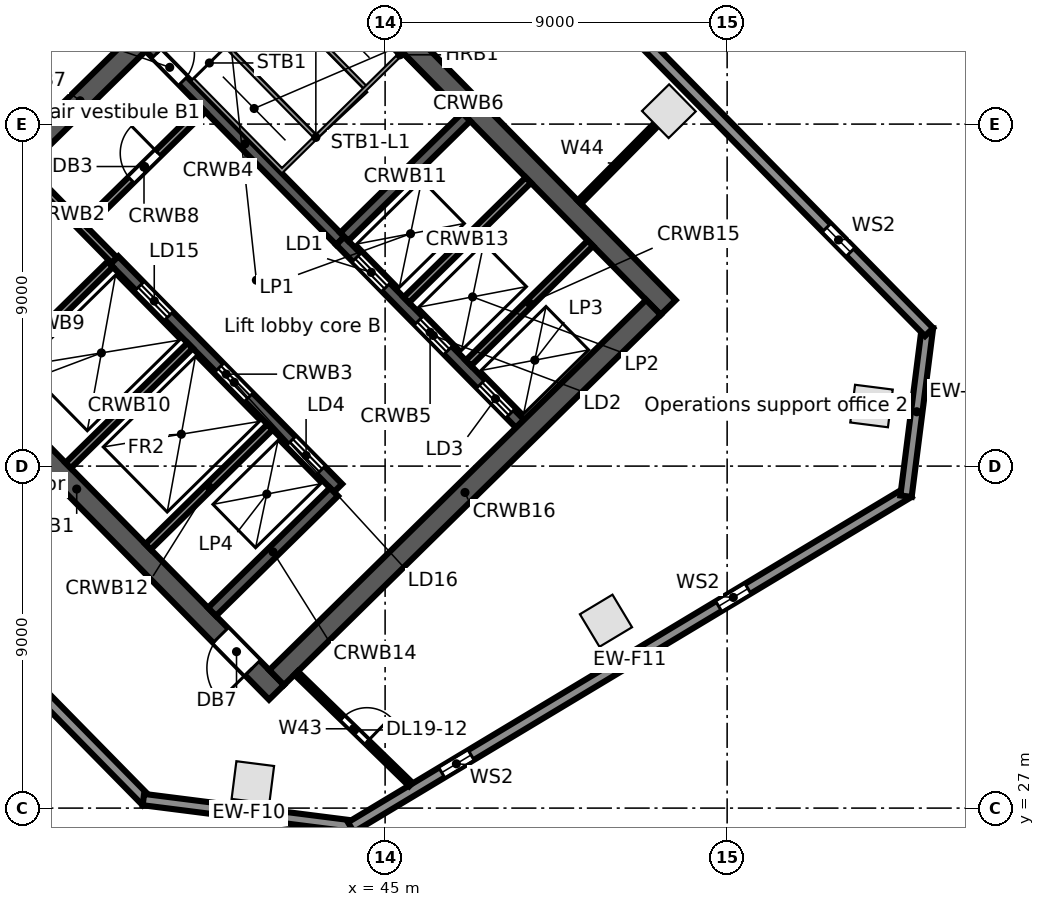
"""IFC4 building model, lengths in metres.
Left out: names, types, materials, properties, quantities, classifications, styles, units other than length and angle.
Written with IfcOpenShell. Run it as: python <this file> out.ifc"""

import sys

from ifc_helpers import new_model, si_unit, direction, frame, frame_2d, origin, origin_2d, place, context, subcontext, project, spatial, rectangle, extrude, element, fill, save


model = new_model("IFC4")
c1 = context("Model", 3, precision=1e-05, world=origin(), true_north=direction((0.0, 1.0)))
c2 = subcontext(c1, "Body", "Model", "MODEL_VIEW")
j1 = project(units=[si_unit("LENGTHUNIT", "METRE"), si_unit("PLANEANGLEUNIT", "RADIAN")], contexts=[c1])
p1 = place(None, origin())
s1 = spatial("IfcSite", under=j1, at=p1, CompositionType="ELEMENT")
p2 = place(p1, origin())
s2 = spatial("IfcBuilding", under=s1, at=p2, CompositionType="ELEMENT")
p3 = place(p2, frame((0.0, 0.0, 97.1)))
s3 = spatial("IfcBuildingStorey", under=s2, at=p3, CompositionType="ELEMENT", Elevation=97.1)
for number, where, z_axis, x_axis in (
    (1, (41.52, 27.675, 0.0), (0.0, 0.0, 1.0), (0.992, -0.126, 0.0)),
    (2, (50.812, 31.931, 0.0), (0.0, 0.0, 1.0), (0.857, 0.515, 0.0)),
    (3, (57.799, 37.581, 0.0), (0.0, 0.0, 1.0), (0.126, 0.992, 0.0)),
    (4, (52.467, 45.339, 0.0), (0.0, 0.0, 1.0), (-0.701, 0.713, 0.0)),
):
    element("IfcColumn", number, at=place(p3, frame(where, z_axis=z_axis, x_axis=x_axis)), inside=s3, PredefinedType="COLUMN", context=c2, shape_type="SweptSolid", body=[
        extrude(rectangle(XDim=1.0, YDim=1.0, at=origin_2d()), origin(), (0.0, 0.0, 1.0), 4.4),
    ])
p4 = place(p3, frame((38.727, 27.181, 0.0), z_axis=(0.0, 0.0, 1.0), x_axis=(-0.700906405975, 0.713253258011, 0.0)))
e5 = element("IfcWall", 5, at=p4, inside=s3, PredefinedType="STANDARD", context=c2, shape_type="SweptSolid", body=[
    extrude(rectangle(XDim=18.923, YDim=0.3, at=frame_2d((9.462, 0.0))), origin(), (0.0, 0.0, 1.0), 4.08),
])
p5 = place(p4, frame((14.967, 0.0, 0.6)))
e6 = element("IfcOpeningElement", 6, at=p5, cuts=e5, PredefinedType="OPENING", context=c2, shape_type="SweptSolid", body=[
    extrude(rectangle(XDim=0.9, YDim=2.8, at=frame_2d((0.45, 1.4))), frame((0.0, 0.16, 0.0), z_axis=(0.0, -1.0, 0.0), x_axis=(1.0, 0.0, 0.0)), (0.0, 0.0, 1.0), 0.32),
])
p6 = place(p4, frame((5.512, 0.0, 0.6)))
e7 = element("IfcOpeningElement", 7, at=p6, cuts=e5, PredefinedType="OPENING", context=c2, shape_type="SweptSolid", body=[
    extrude(rectangle(XDim=0.9, YDim=2.8, at=frame_2d((0.45, 1.4))), frame((0.0, 0.16, 0.0), z_axis=(0.0, -1.0, 0.0), x_axis=(1.0, 0.0, 0.0)), (0.0, 0.0, 1.0), 0.32),
])
p7 = place(p3, frame((44.196, 26.518, 0.0), z_axis=(0.0, 0.0, 1.0), x_axis=(-0.992001881269, 0.126223086474, 0.0)))
e8 = element("IfcWall", 8, at=p7, inside=s3, PredefinedType="STANDARD", context=c2, shape_type="SweptSolid", body=[
    extrude(rectangle(XDim=5.602, YDim=0.3, at=frame_2d((2.801, 0.0))), origin(), (0.0, 0.0, 1.0), 4.08),
])
p8 = place(p3, frame((58.778, 35.318, 0.0), z_axis=(0.0, 0.0, 1.0), x_axis=(-0.857168206138, -0.515036568009, 0.0)))
e9 = element("IfcWall", 9, at=p8, inside=s3, PredefinedType="STANDARD", context=c2, shape_type="SweptSolid", body=[
    extrude(rectangle(XDim=17.125, YDim=0.3, at=frame_2d((8.562, 0.0))), origin(), (0.0, 0.0, 1.0), 4.08),
])
p9 = place(p8, frame((13.435, 0.0, 0.6)))
e10 = element("IfcOpeningElement", 10, at=p9, cuts=e9, PredefinedType="OPENING", context=c2, shape_type="SweptSolid", body=[
    extrude(rectangle(XDim=0.9, YDim=2.8, at=frame_2d((0.45, 1.4))), frame((0.0, 0.16, 0.0), z_axis=(0.0, -1.0, 0.0), x_axis=(1.0, 0.0, 0.0)), (0.0, 0.0, 1.0), 0.32),
])
p10 = place(p8, frame((4.935, 0.0, 0.6)))
e11 = element("IfcOpeningElement", 11, at=p10, cuts=e9, PredefinedType="OPENING", context=c2, shape_type="SweptSolid", body=[
    extrude(rectangle(XDim=0.9, YDim=2.8, at=frame_2d((0.45, 1.4))), frame((0.0, 0.16, 0.0), z_axis=(0.0, -1.0, 0.0), x_axis=(1.0, 0.0, 0.0)), (0.0, 0.0, 1.0), 0.32),
])
p11 = place(p3, frame((59.272, 39.651, 0.0), z_axis=(0.0, 0.0, 1.0), x_axis=(-0.126181137886, -0.992007217938, 0.0)))
e12 = element("IfcWall", 12, at=p11, inside=s3, PredefinedType="STANDARD", context=c2, shape_type="SweptSolid", body=[
    extrude(rectangle(XDim=4.479, YDim=0.3, at=frame_2d((2.24, 0.0))), origin(), (0.0, 0.0, 1.0), 4.08),
])
p12 = place(p3, frame((40.594, 58.577, 0.0), z_axis=(0.0, 0.0, 1.0), x_axis=(0.700909719808, -0.713250001528, 0.0)))
e13 = element("IfcWall", 13, at=p12, inside=s3, PredefinedType="STANDARD", context=c2, shape_type="SweptSolid", body=[
    extrude(rectangle(XDim=26.708, YDim=0.3, at=frame_2d((13.354, 0.0))), origin(), (0.0, 0.0, 1.0), 4.08),
])
p13 = place(p12, frame((22.858, 0.0, 0.6)))
e14 = element("IfcOpeningElement", 14, at=p13, cuts=e13, PredefinedType="OPENING", context=c2, shape_type="SweptSolid", body=[
    extrude(rectangle(XDim=0.9, YDim=2.8, at=frame_2d((0.45, 1.4))), frame((0.0, 0.16, 0.0), z_axis=(0.0, -1.0, 0.0), x_axis=(1.0, 0.0, 0.0)), (0.0, 0.0, 1.0), 0.32),
])
p14 = place(p12, frame((13.987, 0.0, 0.6)))
e15 = element("IfcOpeningElement", 15, at=p14, cuts=e13, PredefinedType="OPENING", context=c2, shape_type="SweptSolid", body=[
    extrude(rectangle(XDim=0.9, YDim=2.8, at=frame_2d((0.45, 1.4))), frame((0.0, 0.16, 0.0), z_axis=(0.0, -1.0, 0.0), x_axis=(1.0, 0.0, 0.0)), (0.0, 0.0, 1.0), 0.32),
])
p15 = place(p12, frame((5.115, 0.0, 0.6)))
e16 = element("IfcOpeningElement", 16, at=p15, cuts=e13, PredefinedType="OPENING", context=c2, shape_type="SweptSolid", body=[
    extrude(rectangle(XDim=0.9, YDim=2.8, at=frame_2d((0.45, 1.4))), frame((0.0, 0.16, 0.0), z_axis=(0.0, -1.0, 0.0), x_axis=(1.0, 0.0, 0.0)), (0.0, 0.0, 1.0), 0.32),
])
p16 = place(p3, frame((31.628, 40.745, 0.0), z_axis=(0.0, 0.0, 1.0), x_axis=(0.700911255944, -0.713248491965, 0.0)))
e17 = element("IfcWall", 17, at=p16, inside=s3, PredefinedType="SOLIDWALL", context=c2, shape_type="SweptSolid", body=[
    extrude(rectangle(XDim=15.0, YDim=0.55, at=frame_2d((7.5, 0.0))), origin(), (0.0, 0.0, 1.0), 4.08),
])
p17 = place(p16, frame((12.9, 0.0, 0.0)))
e18 = element("IfcOpeningElement", 18, at=p17, cuts=e17, PredefinedType="OPENING", context=c2, shape_type="SweptSolid", body=[
    extrude(rectangle(XDim=1.2, YDim=2.1, at=frame_2d((0.6, 1.05))), frame((0.0, 0.285, 0.0), z_axis=(0.0, -1.0, 0.0), x_axis=(1.0, 0.0, 0.0)), (0.0, 0.0, 1.0), 0.57),
])
p18 = place(p3, frame((35.526, 43.805, 0.0), z_axis=(0.0, 0.0, 1.0), x_axis=(0.700884863746, -0.713274426691, 0.0)))
e19 = element("IfcWall", 19, at=p18, inside=s3, PredefinedType="SOLIDWALL", context=c2, shape_type="SweptSolid", body=[
    extrude(rectangle(XDim=3.35, YDim=0.2, at=frame_2d((1.675, 0.0))), origin(), (0.0, 0.0, 1.0), 4.08),
])
p19 = place(p3, frame((37.874, 41.416, 0.0), z_axis=(0.0, 0.0, 1.0), x_axis=(0.700918271237, -0.71324159795, 0.0)))
e20 = element("IfcWall", 20, at=p19, inside=s3, PredefinedType="SOLIDWALL", context=c2, shape_type="SweptSolid", body=[
    extrude(rectangle(XDim=8.4, YDim=0.3, at=frame_2d((4.2, 0.0))), origin(), (0.0, 0.0, 1.0), 4.08),
])
p20 = place(p19, frame((0.95, 0.0, 0.0)))
e21 = element("IfcOpeningElement", 21, at=p20, cuts=e20, PredefinedType="OPENING", context=c2, shape_type="SweptSolid", body=[
    extrude(rectangle(XDim=1.1, YDim=2.1, at=frame_2d((0.55, 1.05))), frame((0.0, 0.16, 0.0), z_axis=(0.0, -1.0, 0.0), x_axis=(1.0, 0.0, 0.0)), (0.0, 0.0, 1.0), 0.32),
])
p21 = place(p19, frame((3.95, 0.0, 0.0)))
e22 = element("IfcOpeningElement", 22, at=p21, cuts=e20, PredefinedType="OPENING", context=c2, shape_type="SweptSolid", body=[
    extrude(rectangle(XDim=1.1, YDim=2.1, at=frame_2d((0.55, 1.05))), frame((0.0, 0.16, 0.0), z_axis=(0.0, -1.0, 0.0), x_axis=(1.0, 0.0, 0.0)), (0.0, 0.0, 1.0), 0.32),
])
p22 = place(p19, frame((6.65, 0.0, 0.0)))
e23 = element("IfcOpeningElement", 23, at=p22, cuts=e20, PredefinedType="OPENING", context=c2, shape_type="SweptSolid", body=[
    extrude(rectangle(XDim=1.1, YDim=2.1, at=frame_2d((0.55, 1.05))), frame((0.0, 0.16, 0.0), z_axis=(0.0, -1.0, 0.0), x_axis=(1.0, 0.0, 0.0)), (0.0, 0.0, 1.0), 0.32),
])
p23 = place(p3, frame((38.807, 47.029, 0.0), z_axis=(0.0, 0.0, 1.0), x_axis=(0.700916852778, -0.713242991898, 0.0)))
e24 = element("IfcWall", 24, at=p23, inside=s3, PredefinedType="SOLIDWALL", context=c2, shape_type="SweptSolid", body=[
    extrude(rectangle(XDim=7.15, YDim=0.3, at=frame_2d((3.575, 0.0))), origin(), (0.0, 0.0, 1.0), 4.08),
])
p24 = place(p23, frame((0.25, 0.0, 0.0)))
e25 = element("IfcOpeningElement", 25, at=p24, cuts=e24, PredefinedType="OPENING", context=c2, shape_type="SweptSolid", body=[
    extrude(rectangle(XDim=1.0, YDim=2.1, at=frame_2d((0.5, 1.05))), frame((0.0, 0.16, 0.0), z_axis=(0.0, -1.0, 0.0), x_axis=(1.0, 0.0, 0.0)), (0.0, 0.0, 1.0), 0.32),
])
p25 = place(p3, frame((43.819, 41.929, 0.0), z_axis=(0.0, 0.0, 1.0), x_axis=(0.700931209592, -0.713228882912, 0.0)))
e26 = element("IfcWall", 26, at=p25, inside=s3, PredefinedType="SOLIDWALL", context=c2, shape_type="SweptSolid", body=[
    extrude(rectangle(XDim=6.75, YDim=0.3, at=frame_2d((3.375, 0.0))), origin(), (0.0, 0.0, 1.0), 4.08),
])
p26 = place(p25, frame((0.615, 0.0, 0.0)))
e27 = element("IfcOpeningElement", 27, at=p26, cuts=e26, PredefinedType="OPENING", context=c2, shape_type="SweptSolid", body=[
    extrude(rectangle(XDim=1.1, YDim=2.1, at=frame_2d((0.55, 1.05))), frame((0.0, 0.16, 0.0), z_axis=(0.0, -1.0, 0.0), x_axis=(1.0, 0.0, 0.0)), (0.0, 0.0, 1.0), 0.32),
])
p27 = place(p25, frame((2.945, 0.0, 0.0)))
e28 = element("IfcOpeningElement", 28, at=p27, cuts=e26, PredefinedType="OPENING", context=c2, shape_type="SweptSolid", body=[
    extrude(rectangle(XDim=1.1, YDim=2.1, at=frame_2d((0.55, 1.05))), frame((0.0, 0.16, 0.0), z_axis=(0.0, -1.0, 0.0), x_axis=(1.0, 0.0, 0.0)), (0.0, 0.0, 1.0), 0.32),
])
p28 = place(p25, frame((5.28, 0.0, 0.0)))
e29 = element("IfcOpeningElement", 29, at=p28, cuts=e26, PredefinedType="OPENING", context=c2, shape_type="SweptSolid", body=[
    extrude(rectangle(XDim=1.1, YDim=2.1, at=frame_2d((0.55, 1.05))), frame((0.0, 0.16, 0.0), z_axis=(0.0, -1.0, 0.0), x_axis=(1.0, 0.0, 0.0)), (0.0, 0.0, 1.0), 0.32),
])
p29 = place(p3, frame((41.934, 50.873, 0.0), z_axis=(0.0, 0.0, 1.0), x_axis=(0.700911255944, -0.713248491965, 0.0)))
e30 = element("IfcWall", 30, at=p29, inside=s3, PredefinedType="SOLIDWALL", context=c2, shape_type="SweptSolid", body=[
    extrude(rectangle(XDim=15.0, YDim=0.55, at=frame_2d((7.5, 0.0))), origin(), (0.0, 0.0, 1.0), 4.08),
])
p30 = place(p3, frame((32.017, 40.742, 0.0), z_axis=(0.0, 0.0, 1.0), x_axis=(0.713253550094, 0.700906108746, 0.0)))
e31 = element("IfcWall", 31, at=p30, inside=s3, PredefinedType="SOLIDWALL", context=c2, shape_type="SweptSolid", body=[
    extrude(rectangle(XDim=13.9, YDim=0.55, at=frame_2d((6.95, 0.0))), origin(), (0.0, 0.0, 1.0), 4.08),
])
p31 = place(p3, frame((37.104, 42.342, 0.0), z_axis=(0.0, 0.0, 1.0), x_axis=(0.713281298468, 0.700877870428, 0.0)))
e32 = element("IfcWall", 32, at=p31, inside=s3, PredefinedType="PARTITIONING", context=c2, shape_type="SweptSolid", body=[
    extrude(rectangle(XDim=4.35, YDim=0.2, at=frame_2d((2.175, 0.0))), origin(), (0.0, 0.0, 1.0), 4.08),
])
p32 = place(p31, frame((1.7, 0.0, 0.0)))
e33 = element("IfcOpeningElement", 33, at=p32, cuts=e32, PredefinedType="OPENING", context=c2, shape_type="SweptSolid", body=[
    extrude(rectangle(XDim=1.0, YDim=2.1, at=frame_2d((0.5, 1.05))), frame((0.0, 0.11, 0.0), z_axis=(0.0, -1.0, 0.0), x_axis=(1.0, 0.0, 0.0)), (0.0, 0.0, 1.0), 0.22),
])
p33 = place(p3, frame((34.558, 38.156, 0.0), z_axis=(0.0, 0.0, 1.0), x_axis=(0.713237924006, 0.700922009755, 0.0)))
e34 = element("IfcWall", 34, at=p33, inside=s3, PredefinedType="SOLIDWALL", context=c2, shape_type="SweptSolid", body=[
    extrude(rectangle(XDim=4.5, YDim=0.2, at=frame_2d((2.25, 0.0))), origin(), (0.0, 0.0, 1.0), 4.08),
])
p34 = place(p3, frame((36.66, 36.017, 0.0), z_axis=(0.0, 0.0, 1.0), x_axis=(0.713264577552, 0.700894886848, 0.0)))
e35 = element("IfcWall", 35, at=p34, inside=s3, PredefinedType="SOLIDWALL", context=c2, shape_type="SweptSolid", body=[
    extrude(rectangle(XDim=4.5, YDim=0.2, at=frame_2d((2.25, 0.0))), origin(), (0.0, 0.0, 1.0), 4.08),
])
p35 = place(p3, frame((43.926, 42.034, 0.0), z_axis=(0.0, 0.0, 1.0), x_axis=(0.713210801054, 0.700949608217, 0.0)))
e36 = element("IfcWall", 36, at=p35, inside=s3, PredefinedType="SOLIDWALL", context=c2, shape_type="SweptSolid", body=[
    extrude(rectangle(XDim=4.5, YDim=0.3, at=frame_2d((2.25, 0.0))), origin(), (0.0, 0.0, 1.0), 4.08),
])
p36 = place(p3, frame((38.763, 33.877, 0.0), z_axis=(0.0, 0.0, 1.0), x_axis=(0.713237455685, 0.700922486305, 0.0)))
e37 = element("IfcWall", 37, at=p36, inside=s3, PredefinedType="SOLIDWALL", context=c2, shape_type="SweptSolid", body=[
    extrude(rectangle(XDim=4.5, YDim=0.2, at=frame_2d((2.25, 0.0))), origin(), (0.0, 0.0, 1.0), 4.08),
])
p37 = place(p3, frame((45.559, 40.373, 0.0), z_axis=(0.0, 0.0, 1.0), x_axis=(0.713264577552, 0.700894886848, 0.0)))
e38 = element("IfcWall", 38, at=p37, inside=s3, PredefinedType="SOLIDWALL", context=c2, shape_type="SweptSolid", body=[
    extrude(rectangle(XDim=4.5, YDim=0.2, at=frame_2d((2.25, 0.0))), origin(), (0.0, 0.0, 1.0), 4.08),
])
p38 = place(p3, frame((40.445, 32.165, 0.0), z_axis=(0.0, 0.0, 1.0), x_axis=(0.713264577552, 0.700894886848, 0.0)))
e39 = element("IfcWall", 39, at=p38, inside=s3, PredefinedType="SOLIDWALL", context=c2, shape_type="SweptSolid", body=[
    extrude(rectangle(XDim=4.5, YDim=0.3, at=frame_2d((2.25, 0.0))), origin(), (0.0, 0.0, 1.0), 4.08),
])
p39 = place(p3, frame((47.192, 38.711, 0.0), z_axis=(0.0, 0.0, 1.0), x_axis=(0.713264577552, 0.700894886848, 0.0)))
e40 = element("IfcWall", 40, at=p39, inside=s3, PredefinedType="SOLIDWALL", context=c2, shape_type="SweptSolid", body=[
    extrude(rectangle(XDim=4.5, YDim=0.2, at=frame_2d((2.25, 0.0))), origin(), (0.0, 0.0, 1.0), 4.08),
])
p40 = place(p3, frame((42.145, 30.435, 0.0), z_axis=(0.0, 0.0, 1.0), x_axis=(0.713253550094, 0.700906108746, 0.0)))
e41 = element("IfcWall", 41, at=p40, inside=s3, PredefinedType="SOLIDWALL", context=c2, shape_type="SweptSolid", body=[
    extrude(rectangle(XDim=13.9, YDim=0.55, at=frame_2d((6.95, 0.0))), origin(), (0.0, 0.0, 1.0), 4.08),
])
p41 = place(p3, frame((42.659, 30.555, 0.0), z_axis=(0.0, 0.0, 1.0), x_axis=(0.716925671772, -0.697149611743, 0.0)))
e42 = element("IfcWall", 42, at=p41, inside=s3, PredefinedType="PARTITIONING", context=c2, shape_type="SweptSolid", body=[
    extrude(rectangle(XDim=4.21, YDim=0.125, at=frame_2d((2.105, 0.0))), origin(), (0.0, 0.0, 1.0), 3.352),
])
p42 = place(p41, frame((1.7, 0.0, 0.0)))
e43 = element("IfcOpeningElement", 43, at=p42, cuts=e42, PredefinedType="OPENING", context=c2, shape_type="SweptSolid", body=[
    extrude(rectangle(XDim=0.9, YDim=2.1, at=frame_2d((0.45, 1.05))), frame((0.0, 0.073, 0.0), z_axis=(0.0, -1.0, 0.0), x_axis=(1.0, 0.0, 0.0)), (0.0, 0.0, 1.0), 0.145),
])
p43 = place(p3, frame((50.111, 42.945, 0.0), z_axis=(0.0, 0.0, 1.0), x_axis=(0.703595931147, 0.710600285445, 0.0)))
e44 = element("IfcWall", 44, at=p43, inside=s3, PredefinedType="PARTITIONING", context=c2, shape_type="SweptSolid", body=[
    extrude(rectangle(XDim=2.858, YDim=0.125, at=frame_2d((1.429, 0.0))), origin(), (0.0, 0.0, 1.0), 3.61),
])
p44 = place(p9, origin())
e45 = element("IfcWindow", 45, at=p44, inside=s3, PartitioningType="SINGLE_PANEL", PredefinedType="WINDOW", context=c2, shape_type="SweptSolid", body=[
    extrude(rectangle(XDim=0.9, YDim=2.8, at=frame_2d((0.45, 1.4))), frame((0.0, 0.03, 0.0), z_axis=(0.0, -1.0, 0.0), x_axis=(1.0, 0.0, 0.0)), (0.0, 0.0, 1.0), 0.06),
])
fill(e10, e45)
p45 = place(p10, origin())
e46 = element("IfcWindow", 46, at=p45, inside=s3, PartitioningType="SINGLE_PANEL", PredefinedType="WINDOW", context=c2, shape_type="SweptSolid", body=[
    extrude(rectangle(XDim=0.9, YDim=2.8, at=frame_2d((0.45, 1.4))), frame((0.0, 0.03, 0.0), z_axis=(0.0, -1.0, 0.0), x_axis=(1.0, 0.0, 0.0)), (0.0, 0.0, 1.0), 0.06),
])
fill(e11, e46)
p46 = place(p13, origin())
e47 = element("IfcWindow", 47, at=p46, inside=s3, PartitioningType="SINGLE_PANEL", PredefinedType="WINDOW", context=c2, shape_type="SweptSolid", body=[
    extrude(rectangle(XDim=0.9, YDim=2.8, at=frame_2d((0.45, 1.4))), frame((0.0, 0.03, 0.0), z_axis=(0.0, -1.0, 0.0), x_axis=(1.0, 0.0, 0.0)), (0.0, 0.0, 1.0), 0.06),
])
fill(e14, e47)
p47 = place(p26, origin())
e48 = element("IfcDoor", 48, at=p47, inside=s3, OperationType="DOUBLE_DOOR_SLIDING", PredefinedType="DOOR", context=c2, shape_type="SweptSolid", body=[
    extrude(rectangle(XDim=1.1, YDim=2.1, at=frame_2d((0.55, 1.05))), frame((0.0, 0.025, 0.0), z_axis=(0.0, -1.0, 0.0), x_axis=(1.0, 0.0, 0.0)), (0.0, 0.0, 1.0), 0.05),
])
fill(e27, e48)
p48 = place(p27, origin())
e49 = element("IfcDoor", 49, at=p48, inside=s3, OperationType="DOUBLE_DOOR_SLIDING", PredefinedType="DOOR", context=c2, shape_type="SweptSolid", body=[
    extrude(rectangle(XDim=1.1, YDim=2.1, at=frame_2d((0.55, 1.05))), frame((0.0, 0.025, 0.0), z_axis=(0.0, -1.0, 0.0), x_axis=(1.0, 0.0, 0.0)), (0.0, 0.0, 1.0), 0.05),
])
fill(e28, e49)
p49 = place(p28, origin())
e50 = element("IfcDoor", 50, at=p49, inside=s3, OperationType="DOUBLE_DOOR_SLIDING", PredefinedType="DOOR", context=c2, shape_type="SweptSolid", body=[
    extrude(rectangle(XDim=1.1, YDim=2.1, at=frame_2d((0.55, 1.05))), frame((0.0, 0.025, 0.0), z_axis=(0.0, -1.0, 0.0), x_axis=(1.0, 0.0, 0.0)), (0.0, 0.0, 1.0), 0.05),
])
fill(e29, e50)
p50 = place(p20, origin())
e51 = element("IfcDoor", 51, at=p50, inside=s3, OperationType="DOUBLE_DOOR_SLIDING", PredefinedType="DOOR", context=c2, shape_type="SweptSolid", body=[
    extrude(rectangle(XDim=1.1, YDim=2.1, at=frame_2d((0.55, 1.05))), frame((0.0, 0.025, 0.0), z_axis=(0.0, -1.0, 0.0), x_axis=(1.0, 0.0, 0.0)), (0.0, 0.0, 1.0), 0.05),
])
fill(e21, e51)
p51 = place(p21, origin())
e52 = element("IfcDoor", 52, at=p51, inside=s3, OperationType="DOUBLE_DOOR_SLIDING", PredefinedType="DOOR", context=c2, shape_type="SweptSolid", body=[
    extrude(rectangle(XDim=1.1, YDim=2.1, at=frame_2d((0.55, 1.05))), frame((0.0, 0.025, 0.0), z_axis=(0.0, -1.0, 0.0), x_axis=(1.0, 0.0, 0.0)), (0.0, 0.0, 1.0), 0.05),
])
fill(e22, e52)
p52 = place(p22, origin())
e53 = element("IfcDoor", 53, at=p52, inside=s3, OperationType="DOUBLE_DOOR_SLIDING", PredefinedType="DOOR", context=c2, shape_type="SweptSolid", body=[
    extrude(rectangle(XDim=1.1, YDim=2.1, at=frame_2d((0.55, 1.05))), frame((0.0, 0.025, 0.0), z_axis=(0.0, -1.0, 0.0), x_axis=(1.0, 0.0, 0.0)), (0.0, 0.0, 1.0), 0.05),
])
fill(e23, e53)
p53 = place(p24, origin())
e54 = element("IfcDoor", 54, at=p53, inside=s3, OperationType="SINGLE_SWING_LEFT", PredefinedType="DOOR", context=c2, shape_type="SweptSolid", body=[
    extrude(rectangle(XDim=1.0, YDim=2.1, at=frame_2d((0.5, 1.05))), frame((0.0, 0.025, 0.0), z_axis=(0.0, -1.0, 0.0), x_axis=(1.0, 0.0, 0.0)), (0.0, 0.0, 1.0), 0.05),
])
fill(e25, e54)
p54 = place(p32, origin())
e55 = element("IfcDoor", 55, at=p54, inside=s3, OperationType="SINGLE_SWING_RIGHT", PredefinedType="DOOR", context=c2, shape_type="SweptSolid", body=[
    extrude(rectangle(XDim=1.0, YDim=2.1, at=frame_2d((0.5, 1.05))), frame((0.0, 0.025, 0.0), z_axis=(0.0, -1.0, 0.0), x_axis=(1.0, 0.0, 0.0)), (0.0, 0.0, 1.0), 0.05),
])
fill(e33, e55)
p55 = place(p17, frame((1.2, 0.0, 0.0), z_axis=(0.0, 0.0, 1.0), x_axis=(-1.0, 0.0, 0.0)))
e56 = element("IfcDoor", 56, at=p55, inside=s3, OperationType="SINGLE_SWING_LEFT", PredefinedType="DOOR", context=c2, shape_type="SweptSolid", body=[
    extrude(rectangle(XDim=1.2, YDim=2.1, at=frame_2d((0.6, 1.05))), frame((0.0, 0.025, 0.0), z_axis=(0.0, -1.0, 0.0), x_axis=(1.0, 0.0, 0.0)), (0.0, 0.0, 1.0), 0.05),
])
fill(e18, e56)
p56 = place(p42, origin())
e57 = element("IfcDoor", 57, at=p56, inside=s3, OperationType="SINGLE_SWING_RIGHT", PredefinedType="DOOR", context=c2, shape_type="SweptSolid", body=[
    extrude(rectangle(XDim=0.9, YDim=2.1, at=frame_2d((0.45, 1.05))), frame((0.0, 0.025, 0.0), z_axis=(0.0, -1.0, 0.0), x_axis=(1.0, 0.0, 0.0)), (0.0, 0.0, 1.0), 0.05),
])
fill(e43, e57)
save(model, sys.argv[1])
